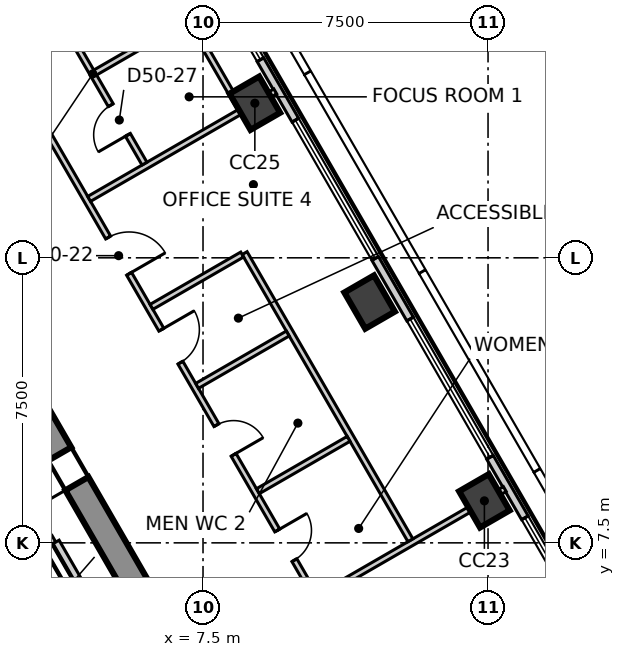
"""IFC4 building model, lengths in metres.
Left out: names, types, materials, properties, quantities, classifications, styles, units other than length and angle.
Written with IfcOpenShell. Run it as: python <this file> out.ifc"""

import sys

from ifc_helpers import new_model, si_unit, direction, frame, frame_2d, origin, origin_2d, place, context, subcontext, project, spatial, polyline, rectangle, outline, extrude, element, fill, save


model = new_model("IFC4")
c1 = context("Model", 3, precision=1e-05, world=origin(), true_north=direction((0.0, 1.0)))
c2 = subcontext(c1, "Body", "Model", "MODEL_VIEW")
j1 = project(units=[si_unit("LENGTHUNIT", "METRE"), si_unit("PLANEANGLEUNIT", "RADIAN")], contexts=[c1])
p1 = place(None, origin())
s1 = spatial("IfcSite", under=j1, at=p1, CompositionType="ELEMENT")
p2 = place(p1, origin())
s2 = spatial("IfcBuilding", under=s1, at=p2, CompositionType="ELEMENT")
p3 = place(p2, frame((0.0, 0.0, 215.3)))
s3 = spatial("IfcBuildingStorey", under=s2, at=p3, CompositionType="ELEMENT", Elevation=215.3)
p4 = place(p3, frame((12.413, -5.2, -0.3), z_axis=(0.0, 0.0, 1.0), x_axis=(-0.500011533395, 0.866018744874, 0.0)))
e1 = element("IfcWall", 1, at=p4, inside=s3, PredefinedType="SHEAR", context=c2, shape_type="SweptSolid", body=[
    extrude(outline(polyline([(-0.202, -0.35), (1.782, -0.35), (3.766, -0.35), (5.75, -0.35), (7.734, -0.35), (9.718, -0.35), (11.702, -0.35), (13.686, -0.35), (15.67, -0.35), (17.654, -0.35), (19.638, -0.35), (21.622, -0.35), (21.218, 0.35), (19.307, 0.35), (17.397, 0.35), (15.486, 0.35), (13.576, 0.35), (11.665, 0.35), (9.755, 0.35), (7.844, 0.35), (5.934, 0.35), (4.023, 0.35), (2.113, 0.35), (0.202, 0.35), (-0.202, -0.35)])), origin(), (0.0, 0.0, 1.0), 4.0),
])
p5 = place(p4, frame((4.055, 0.0, 0.3)))
e2 = element("IfcOpeningElement", 2, at=p5, cuts=e1, PredefinedType="OPENING", context=c2, shape_type="SweptSolid", body=[
    extrude(rectangle(XDim=0.9, YDim=2.1, at=frame_2d((0.45, 1.05))), frame((0.0, 0.36, 0.0), z_axis=(0.0, -1.0, 0.0), x_axis=(1.0, 0.0, 0.0)), (0.0, 0.0, 1.0), 0.72),
])
p6 = place(p4, frame((16.465, 0.0, 0.3)))
e3 = element("IfcOpeningElement", 3, at=p6, cuts=e1, PredefinedType="OPENING", context=c2, shape_type="SweptSolid", body=[
    extrude(rectangle(XDim=0.9, YDim=2.1, at=frame_2d((0.45, 1.05))), frame((0.0, 0.36, 0.0), z_axis=(0.0, -1.0, 0.0), x_axis=(1.0, 0.0, 0.0)), (0.0, 0.0, 1.0), 0.72),
])
for number, where, z_axis, x_axis in (
    (4, (14.904, 8.605, -0.3), (0.0, 0.0, 1.0), (-0.5, 0.866, 0.0)),
    (5, (11.884, 13.836, -0.3), (0.0, 0.0, 1.0), (-0.5, 0.866, 0.0)),
    (6, (8.864, 19.068, -0.3), (0.0, 0.0, 1.0), (-0.5, 0.866, 0.0)),
):
    element("IfcColumn", number, at=place(p3, frame(where, z_axis=z_axis, x_axis=x_axis)), inside=s3, PredefinedType="COLUMN", context=c2, shape_type="SweptSolid", body=[
        extrude(rectangle(XDim=1.1, YDim=0.9, at=origin_2d()), origin(), (0.0, 0.0, 1.0), 4.0),
    ])
p7 = place(p3, frame((28.243, -13.098, 0.0), z_axis=(0.0, 0.0, 1.0), x_axis=(-0.500001688958, 0.866024428662, 0.0)))
e7 = element("IfcWall", 7, at=p7, inside=s3, PredefinedType="ELEMENTEDWALL", context=c2, shape_type="SweptSolid", body=[
    extrude(rectangle(XDim=50.909, YDim=0.2, at=frame_2d((25.455, 0.0))), origin(), (0.0, 0.0, 1.0), 3.7),
])
p8 = place(p7, frame((2.223, 0.0, 0.9)))
e8 = element("IfcOpeningElement", 8, at=p8, cuts=e7, PredefinedType="OPENING", context=c2, shape_type="SweptSolid", body=[
    extrude(rectangle(XDim=4.2, YDim=2.5, at=frame_2d((2.1, 1.25))), frame((0.0, 0.11, 0.0), z_axis=(0.0, -1.0, 0.0), x_axis=(1.0, 0.0, 0.0)), (0.0, 0.0, 1.0), 0.22),
])
p9 = place(p7, frame((8.263, 0.0, 0.9)))
e9 = element("IfcOpeningElement", 9, at=p9, cuts=e7, PredefinedType="OPENING", context=c2, shape_type="SweptSolid", body=[
    extrude(rectangle(XDim=4.2, YDim=2.5, at=frame_2d((2.1, 1.25))), frame((0.0, 0.11, 0.0), z_axis=(0.0, -1.0, 0.0), x_axis=(1.0, 0.0, 0.0)), (0.0, 0.0, 1.0), 0.22),
])
p10 = place(p7, frame((14.304, 0.0, 0.9)))
e10 = element("IfcOpeningElement", 10, at=p10, cuts=e7, PredefinedType="OPENING", context=c2, shape_type="SweptSolid", body=[
    extrude(rectangle(XDim=4.2, YDim=2.5, at=frame_2d((2.1, 1.25))), frame((0.0, 0.11, 0.0), z_axis=(0.0, -1.0, 0.0), x_axis=(1.0, 0.0, 0.0)), (0.0, 0.0, 1.0), 0.22),
])
p11 = place(p7, frame((20.345, 0.0, 0.9)))
e11 = element("IfcOpeningElement", 11, at=p11, cuts=e7, PredefinedType="OPENING", context=c2, shape_type="SweptSolid", body=[
    extrude(rectangle(XDim=4.2, YDim=2.5, at=frame_2d((2.1, 1.25))), frame((0.0, 0.11, 0.0), z_axis=(0.0, -1.0, 0.0), x_axis=(1.0, 0.0, 0.0)), (0.0, 0.0, 1.0), 0.22),
])
p12 = place(p7, frame((26.385, 0.0, 0.9)))
e12 = element("IfcOpeningElement", 12, at=p12, cuts=e7, PredefinedType="OPENING", context=c2, shape_type="SweptSolid", body=[
    extrude(rectangle(XDim=4.2, YDim=2.5, at=frame_2d((2.1, 1.25))), frame((0.0, 0.11, 0.0), z_axis=(0.0, -1.0, 0.0), x_axis=(1.0, 0.0, 0.0)), (0.0, 0.0, 1.0), 0.22),
])
p13 = place(p7, frame((32.426, 0.0, 0.9)))
e13 = element("IfcOpeningElement", 13, at=p13, cuts=e7, PredefinedType="OPENING", context=c2, shape_type="SweptSolid", body=[
    extrude(rectangle(XDim=4.2, YDim=2.5, at=frame_2d((2.1, 1.25))), frame((0.0, 0.11, 0.0), z_axis=(0.0, -1.0, 0.0), x_axis=(1.0, 0.0, 0.0)), (0.0, 0.0, 1.0), 0.22),
])
p14 = place(p7, frame((38.466, 0.0, 0.9)))
e14 = element("IfcOpeningElement", 14, at=p14, cuts=e7, PredefinedType="OPENING", context=c2, shape_type="SweptSolid", body=[
    extrude(rectangle(XDim=4.2, YDim=2.5, at=frame_2d((2.1, 1.25))), frame((0.0, 0.11, 0.0), z_axis=(0.0, -1.0, 0.0), x_axis=(1.0, 0.0, 0.0)), (0.0, 0.0, 1.0), 0.22),
])
p15 = place(p7, frame((44.507, 0.0, 0.9)))
e15 = element("IfcOpeningElement", 15, at=p15, cuts=e7, PredefinedType="OPENING", context=c2, shape_type="SweptSolid", body=[
    extrude(rectangle(XDim=4.2, YDim=2.5, at=frame_2d((2.1, 1.25))), frame((0.0, 0.11, 0.0), z_axis=(0.0, -1.0, 0.0), x_axis=(1.0, 0.0, 0.0)), (0.0, 0.0, 1.0), 0.22),
])
p16 = place(p3, frame((10.544, 6.087, 0.0), z_axis=(0.0, 0.0, 1.0), x_axis=(0.865959810878, 0.500113593041, 0.0)))
e16 = element("IfcWall", 16, at=p16, inside=s3, PredefinedType="PARTITIONING", context=c2, shape_type="SweptSolid", body=[
    extrude(rectangle(XDim=5.655, YDim=0.15, at=frame_2d((2.828, 0.0))), origin(), (0.0, 0.0, 1.0), 3.2),
])
p17 = place(p3, frame((0.075, 24.07, 0.0), z_axis=(0.0, 0.0, 1.0), x_axis=(0.500006834213, -0.866021458014, 0.0)))
e17 = element("IfcWall", 17, at=p17, inside=s3, PredefinedType="PARTITIONING", context=c2, shape_type="SweptSolid", body=[
    extrude(rectangle(XDim=41.616, YDim=0.15, at=frame_2d((20.808, 0.0))), origin(), (0.0, 0.0, 1.0), 3.7),
])
p18 = place(p17, frame((33.715, 0.0, 0.0)))
e18 = element("IfcOpeningElement", 18, at=p18, cuts=e17, PredefinedType="OPENING", context=c2, shape_type="SweptSolid", body=[
    extrude(rectangle(XDim=1.1, YDim=2.1, at=frame_2d((0.55, 1.05))), frame((0.0, 0.085, 0.0), z_axis=(0.0, -1.0, 0.0), x_axis=(1.0, 0.0, 0.0)), (0.0, 0.0, 1.0), 0.17),
])
p19 = place(p17, frame((22.098, 0.0, 0.0)))
e19 = element("IfcOpeningElement", 19, at=p19, cuts=e17, PredefinedType="OPENING", context=c2, shape_type="SweptSolid", body=[
    extrude(rectangle(XDim=1.0, YDim=2.1, at=frame_2d((0.5, 1.05))), frame((0.0, 0.085, 0.0), z_axis=(0.0, -1.0, 0.0), x_axis=(1.0, 0.0, 0.0)), (0.0, 0.0, 1.0), 0.17),
])
p20 = place(p17, frame((25.198, 0.0, 0.0)))
e20 = element("IfcOpeningElement", 20, at=p20, cuts=e17, PredefinedType="OPENING", context=c2, shape_type="SweptSolid", body=[
    extrude(rectangle(XDim=0.9, YDim=2.1, at=frame_2d((0.45, 1.05))), frame((0.0, 0.085, 0.0), z_axis=(0.0, -1.0, 0.0), x_axis=(1.0, 0.0, 0.0)), (0.0, 0.0, 1.0), 0.17),
])
p21 = place(p17, frame((9.858, 0.0, 0.0)))
e21 = element("IfcOpeningElement", 21, at=p21, cuts=e17, PredefinedType="OPENING", context=c2, shape_type="SweptSolid", body=[
    extrude(rectangle(XDim=1.1, YDim=2.1, at=frame_2d((0.55, 1.05))), frame((0.0, 0.085, 0.0), z_axis=(0.0, -1.0, 0.0), x_axis=(1.0, 0.0, 0.0)), (0.0, 0.0, 1.0), 0.17),
])
p22 = place(p17, frame((18.758, 0.0, 0.0)))
e22 = element("IfcOpeningElement", 22, at=p22, cuts=e17, PredefinedType="OPENING", context=c2, shape_type="SweptSolid", body=[
    extrude(rectangle(XDim=0.9, YDim=2.1, at=frame_2d((0.45, 1.05))), frame((0.0, 0.085, 0.0), z_axis=(0.0, -1.0, 0.0), x_axis=(1.0, 0.0, 0.0)), (0.0, 0.0, 1.0), 0.17),
])
p23 = place(p17, frame((15.558, 0.0, 0.0)))
e23 = element("IfcOpeningElement", 23, at=p23, cuts=e17, PredefinedType="OPENING", context=c2, shape_type="SweptSolid", body=[
    extrude(rectangle(XDim=0.9, YDim=2.1, at=frame_2d((0.45, 1.05))), frame((0.0, 0.085, 0.0), z_axis=(0.0, -1.0, 0.0), x_axis=(1.0, 0.0, 0.0)), (0.0, 0.0, 1.0), 0.17),
])
p24 = place(p17, frame((12.658, 0.0, 0.0)))
e24 = element("IfcOpeningElement", 24, at=p24, cuts=e17, PredefinedType="OPENING", context=c2, shape_type="SweptSolid", body=[
    extrude(rectangle(XDim=1.0, YDim=2.1, at=frame_2d((0.5, 1.05))), frame((0.0, 0.085, 0.0), z_axis=(0.0, -1.0, 0.0), x_axis=(1.0, 0.0, 0.0)), (0.0, 0.0, 1.0), 0.17),
])
p25 = place(p17, frame((3.776, 0.0, 0.0)))
e25 = element("IfcOpeningElement", 25, at=p25, cuts=e17, PredefinedType="OPENING", context=c2, shape_type="SweptSolid", body=[
    extrude(rectangle(XDim=1.1, YDim=2.1, at=frame_2d((0.55, 1.05))), frame((0.0, 0.085, 0.0), z_axis=(0.0, -1.0, 0.0), x_axis=(1.0, 0.0, 0.0)), (0.0, 0.0, 1.0), 0.17),
])
p26 = place(p3, frame((4.503, 16.55, 0.0), z_axis=(0.0, 0.0, 1.0), x_axis=(0.866021685936, 0.500006439447, 0.0)))
e26 = element("IfcWall", 26, at=p26, inside=s3, PredefinedType="PARTITIONING", context=c2, shape_type="SweptSolid", body=[
    extrude(rectangle(XDim=5.656, YDim=0.15, at=frame_2d((2.828, 0.0))), origin(), (0.0, 0.0, 1.0), 3.7),
])
p27 = place(p3, frame((8.595, 15.124, 0.0), z_axis=(0.0, 0.0, 1.0), x_axis=(0.499970334739, -0.866042530354, 0.0)))
e27 = element("IfcWall", 27, at=p27, inside=s3, PredefinedType="PARTITIONING", context=c2, shape_type="SweptSolid", body=[
    extrude(rectangle(XDim=8.725, YDim=0.15, at=frame_2d((4.362, 0.0))), origin(), (0.0, 0.0, 1.0), 3.7),
])
p28 = place(p3, frame((6.144, 13.709, 0.0), z_axis=(0.0, 0.0, 1.0), x_axis=(0.866119184418, 0.499837531988, 0.0)))
e28 = element("IfcWall", 28, at=p28, inside=s3, PredefinedType="PARTITIONING", context=c2, shape_type="SweptSolid", body=[
    extrude(rectangle(XDim=2.755, YDim=0.15, at=frame_2d((1.377, 0.0))), origin(), (0.0, 0.0, 1.0), 3.7),
])
p29 = place(p3, frame((7.344, 11.63, 0.0), z_axis=(0.0, 0.0, 1.0), x_axis=(0.86592732884, 0.500169832324, 0.0)))
e29 = element("IfcWall", 29, at=p29, inside=s3, PredefinedType="PARTITIONING", context=c2, shape_type="SweptSolid", body=[
    extrude(rectangle(XDim=2.755, YDim=0.15, at=frame_2d((1.378, 0.0))), origin(), (0.0, 0.0, 1.0), 3.7),
])
p30 = place(p3, frame((8.944, 8.859, 0.0), z_axis=(0.0, 0.0, 1.0), x_axis=(0.866080816704, 0.499904009723, 0.0)))
e30 = element("IfcWall", 30, at=p30, inside=s3, PredefinedType="PARTITIONING", context=c2, shape_type="SweptSolid", body=[
    extrude(rectangle(XDim=2.755, YDim=0.15, at=frame_2d((1.377, 0.0))), origin(), (0.0, 0.0, 1.0), 3.7),
])
p31 = place(p3, frame((4.662, 19.875, 0.0), z_axis=(0.0, 0.0, 1.0), x_axis=(0.865965703354, 0.500103389924, 0.0)))
e31 = element("IfcWall", 31, at=p31, inside=s3, PredefinedType="PARTITIONING", context=c2, shape_type="SweptSolid", body=[
    extrude(rectangle(XDim=2.755, YDim=0.15, at=frame_2d((1.378, 0.0))), origin(), (0.0, 0.0, 1.0), 3.7),
])
p32 = place(p3, frame((5.713, 23.715, 0.0), z_axis=(0.0, 0.0, 1.0), x_axis=(0.499931554694, -0.866064917094, 0.0)))
e32 = element("IfcWall", 32, at=p32, inside=s3, PredefinedType="PARTITIONING", context=c2, shape_type="SweptSolid", body=[
    extrude(rectangle(XDim=5.525, YDim=0.15, at=frame_2d((2.763, 0.0))), origin(), (0.0, 0.0, 1.0), 2.95),
])
p33 = place(p3, frame((3.235, 22.198, 0.0), z_axis=(0.0, 0.0, 1.0), x_axis=(0.49996933381, -0.866043108194, 0.0)))
e33 = element("IfcWall", 33, at=p33, inside=s3, PredefinedType="PARTITIONING", context=c2, shape_type="SweptSolid", body=[
    extrude(rectangle(XDim=5.45, YDim=0.15, at=frame_2d((2.725, 0.0))), origin(), (0.0, 0.0, 1.0), 3.7),
])
p34 = place(p33, frame((3.675, 0.0, 0.0)))
e34 = element("IfcOpeningElement", 34, at=p34, cuts=e33, PredefinedType="OPENING", context=c2, shape_type="SweptSolid", body=[
    extrude(rectangle(XDim=0.9, YDim=2.1, at=frame_2d((0.45, 1.05))), frame((0.0, 0.085, 0.0), z_axis=(0.0, -1.0, 0.0), x_axis=(1.0, 0.0, 0.0)), (0.0, 0.0, 1.0), 0.17),
])
p35 = place(p3, frame((-0.002, 5.541, 0.0), z_axis=(0.0, 0.0, 1.0), x_axis=(0.86600155993, 0.500041296494, 0.0)))
e35 = element("IfcWall", 35, at=p35, inside=s3, PredefinedType="SOLIDWALL", context=c2, shape_type="SweptSolid", body=[
    extrude(rectangle(XDim=4.132, YDim=0.2, at=frame_2d((2.066, 0.0))), origin(), (0.0, 0.0, 1.0), 3.7),
])
p36 = place(p3, frame((3.626, 7.52, 0.0), z_axis=(0.0, 0.0, 1.0), x_axis=(0.500060147554, -0.865990674793, 0.0)))
e36 = element("IfcWall", 36, at=p36, inside=s3, PredefinedType="SOLIDWALL", context=c2, shape_type="SweptSolid", body=[
    extrude(rectangle(XDim=2.9, YDim=0.2, at=frame_2d((1.45, 0.0))), origin(), (0.0, 0.0, 1.0), 3.7),
])
p37 = place(p11, origin())
e37 = element("IfcWindow", 37, at=p37, inside=s3, PartitioningType="SINGLE_PANEL", PredefinedType="WINDOW", context=c2, shape_type="SweptSolid", body=[
    extrude(rectangle(XDim=4.2, YDim=2.5, at=frame_2d((2.1, 1.25))), frame((0.0, 0.03, 0.0), z_axis=(0.0, -1.0, 0.0), x_axis=(1.0, 0.0, 0.0)), (0.0, 0.0, 1.0), 0.06),
])
fill(e11, e37)
p38 = place(p12, origin())
e38 = element("IfcWindow", 38, at=p38, inside=s3, PartitioningType="SINGLE_PANEL", PredefinedType="WINDOW", context=c2, shape_type="SweptSolid", body=[
    extrude(rectangle(XDim=4.2, YDim=2.5, at=frame_2d((2.1, 1.25))), frame((0.0, 0.03, 0.0), z_axis=(0.0, -1.0, 0.0), x_axis=(1.0, 0.0, 0.0)), (0.0, 0.0, 1.0), 0.06),
])
fill(e12, e38)
p39 = place(p13, origin())
e39 = element("IfcWindow", 39, at=p39, inside=s3, PartitioningType="SINGLE_PANEL", PredefinedType="WINDOW", context=c2, shape_type="SweptSolid", body=[
    extrude(rectangle(XDim=4.2, YDim=2.5, at=frame_2d((2.1, 1.25))), frame((0.0, 0.03, 0.0), z_axis=(0.0, -1.0, 0.0), x_axis=(1.0, 0.0, 0.0)), (0.0, 0.0, 1.0), 0.06),
])
fill(e13, e39)
p40 = place(p14, origin())
e40 = element("IfcWindow", 40, at=p40, inside=s3, PartitioningType="SINGLE_PANEL", PredefinedType="WINDOW", context=c2, shape_type="SweptSolid", body=[
    extrude(rectangle(XDim=4.2, YDim=2.5, at=frame_2d((2.1, 1.25))), frame((0.0, 0.03, 0.0), z_axis=(0.0, -1.0, 0.0), x_axis=(1.0, 0.0, 0.0)), (0.0, 0.0, 1.0), 0.06),
])
fill(e14, e40)
p41 = place(p21, origin())
e41 = element("IfcDoor", 41, at=p41, inside=s3, OperationType="SINGLE_SWING_LEFT", PredefinedType="DOOR", context=c2, shape_type="SweptSolid", body=[
    extrude(rectangle(XDim=1.1, YDim=2.1, at=frame_2d((0.55, 1.05))), frame((0.0, 0.025, 0.0), z_axis=(0.0, -1.0, 0.0), x_axis=(1.0, 0.0, 0.0)), (0.0, 0.0, 1.0), 0.05),
])
fill(e21, e41)
p42 = place(p22, origin())
e42 = element("IfcDoor", 42, at=p42, inside=s3, OperationType="SINGLE_SWING_RIGHT", PredefinedType="DOOR", context=c2, shape_type="SweptSolid", body=[
    extrude(rectangle(XDim=0.9, YDim=2.1, at=frame_2d((0.45, 1.05))), frame((0.0, 0.025, 0.0), z_axis=(0.0, -1.0, 0.0), x_axis=(1.0, 0.0, 0.0)), (0.0, 0.0, 1.0), 0.05),
])
fill(e22, e42)
p43 = place(p23, origin())
e43 = element("IfcDoor", 43, at=p43, inside=s3, OperationType="SINGLE_SWING_LEFT", PredefinedType="DOOR", context=c2, shape_type="SweptSolid", body=[
    extrude(rectangle(XDim=0.9, YDim=2.1, at=frame_2d((0.45, 1.05))), frame((0.0, 0.025, 0.0), z_axis=(0.0, -1.0, 0.0), x_axis=(1.0, 0.0, 0.0)), (0.0, 0.0, 1.0), 0.05),
])
fill(e23, e43)
p44 = place(p24, origin())
e44 = element("IfcDoor", 44, at=p44, inside=s3, OperationType="SINGLE_SWING_RIGHT", PredefinedType="DOOR", context=c2, shape_type="SweptSolid", body=[
    extrude(rectangle(XDim=1.0, YDim=2.1, at=frame_2d((0.5, 1.05))), frame((0.0, 0.025, 0.0), z_axis=(0.0, -1.0, 0.0), x_axis=(1.0, 0.0, 0.0)), (0.0, 0.0, 1.0), 0.05),
])
fill(e24, e44)
p45 = place(p34, origin())
e45 = element("IfcDoor", 45, at=p45, inside=s3, OperationType="SINGLE_SWING_RIGHT", PredefinedType="DOOR", context=c2, shape_type="SweptSolid", body=[
    extrude(rectangle(XDim=0.9, YDim=2.1, at=frame_2d((0.45, 1.05))), frame((0.0, 0.025, 0.0), z_axis=(0.0, -1.0, 0.0), x_axis=(1.0, 0.0, 0.0)), (0.0, 0.0, 1.0), 0.05),
])
fill(e34, e45)
p46 = place(p6, origin())
e46 = element("IfcDoor", 46, at=p46, inside=s3, OperationType="SINGLE_SWING_RIGHT", PredefinedType="DOOR", context=c2, shape_type="SweptSolid", body=[
    extrude(rectangle(XDim=0.9, YDim=2.1, at=frame_2d((0.45, 1.05))), frame((0.0, 0.025, 0.0), z_axis=(0.0, -1.0, 0.0), x_axis=(1.0, 0.0, 0.0)), (0.0, 0.0, 1.0), 0.05),
])
fill(e3, e46)
save(model, sys.argv[1])
